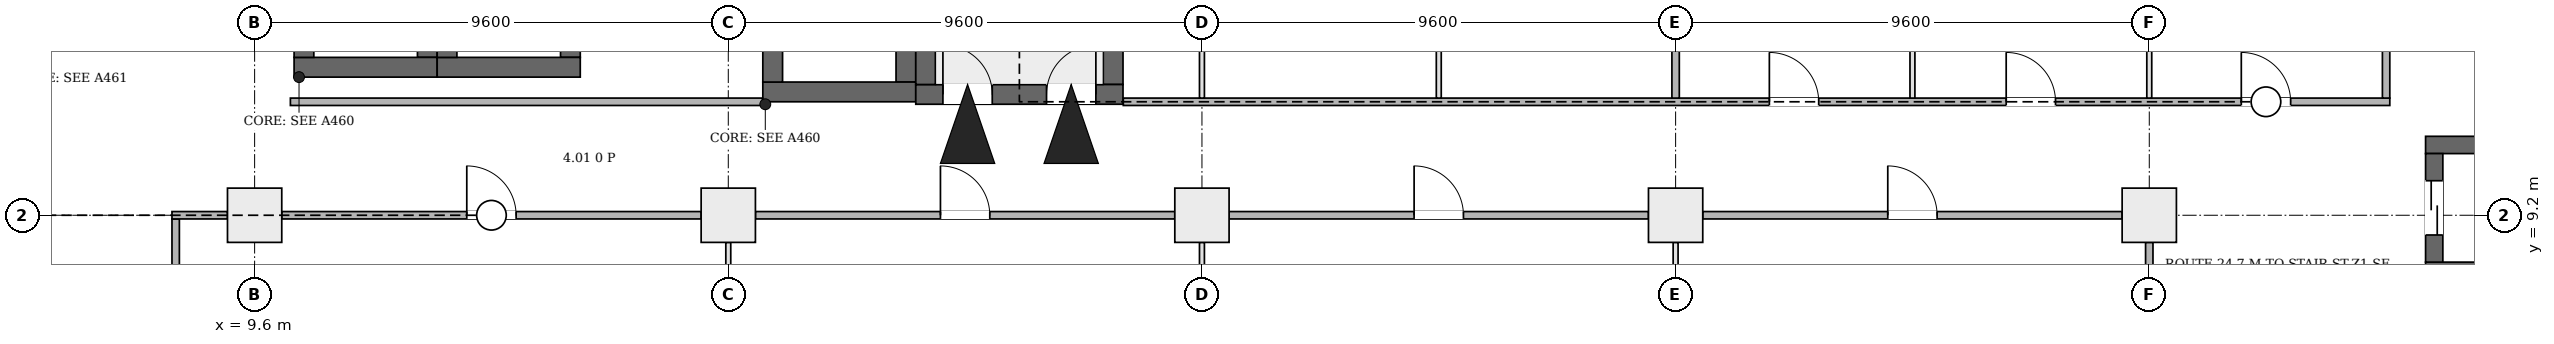
"""IFC4 building model, lengths in metres.
Left out: names, types, materials, properties, quantities, classifications, styles, units other than length and angle.
Written with IfcOpenShell. Run it as: python <this file> out.ifc"""

import sys

from ifc_helpers import new_model, si_unit, direction, frame, frame_2d, origin, origin_2d, place, context, subcontext, project, spatial, rectangle, extrude, element, fill, save


model = new_model("IFC4")
c1 = context("Model", 3, precision=1e-05, world=origin(), true_north=direction((0.0, 1.0)))
c2 = subcontext(c1, "Body", "Model", "MODEL_VIEW")
j1 = project(units=[si_unit("LENGTHUNIT", "METRE"), si_unit("PLANEANGLEUNIT", "RADIAN")], contexts=[c1])
p1 = place(None, origin())
s1 = spatial("IfcSite", under=j1, at=p1, CompositionType="ELEMENT")
p2 = place(p1, origin())
s2 = spatial("IfcBuilding", under=s1, at=p2, CompositionType="ELEMENT")
p3 = place(p2, frame((0.0, 0.0, 26.7)))
s3 = spatial("IfcBuildingStorey", under=s2, at=p3, CompositionType="ELEMENT", Elevation=26.7)
p4 = place(p3, frame((23.0, 11.65, 0.0), z_axis=(0.0, 0.0, 1.0), x_axis=(1.0, 0.0, 0.0)))
e1 = element("IfcWall", 1, at=p4, inside=s3, PredefinedType="SHEAR", context=c2, shape_type="SweptSolid", body=[
    extrude(rectangle(XDim=4.2, YDim=0.4, at=frame_2d((2.1, 0.0))), origin(), (0.0, 0.0, 1.0), 5.2),
])
p5 = place(p4, frame((0.55, 0.0, 0.0)))
e2 = element("IfcOpeningElement", 2, at=p5, cuts=e1, PredefinedType="OPENING", context=c2, shape_type="SweptSolid", body=[
    extrude(rectangle(XDim=1.0, YDim=2.1, at=frame_2d((0.5, 1.05))), frame((0.0, 0.21, 0.0), z_axis=(0.0, -1.0, 0.0), x_axis=(1.0, 0.0, 0.0)), (0.0, 0.0, 1.0), 0.42),
])
p6 = place(p4, frame((2.65, 0.0, 0.0)))
e3 = element("IfcOpeningElement", 3, at=p6, cuts=e1, PredefinedType="OPENING", context=c2, shape_type="SweptSolid", body=[
    extrude(rectangle(XDim=1.0, YDim=2.1, at=frame_2d((0.5, 1.05))), frame((0.0, 0.21, 0.0), z_axis=(0.0, -1.0, 0.0), x_axis=(1.0, 0.0, 0.0)), (0.0, 0.0, 1.0), 0.42),
])
for number, where, z_axis, x_axis in (
    (4, (23.2, 11.85, 0.0), (0.0, 0.0, 1.0), (0.0, 1.0, 0.0)),
    (5, (27.0, 11.85, 0.0), (0.0, 0.0, 1.0), (0.0, 1.0, 0.0)),
):
    element("IfcWall", number, at=place(p3, frame(where, z_axis=z_axis, x_axis=x_axis)), inside=s3, PredefinedType="SHEAR", context=c2, shape_type="SweptSolid", body=[
        extrude(rectangle(XDim=6.6, YDim=0.4, at=frame_2d((3.3, 0.0))), origin(), (0.0, 0.0, 1.0), 5.2),
    ])
for number, where, z_axis, x_axis in (
    (6, (53.6, 8.075, 0.0), (0.0, 0.0, 1.0), (1.0, 0.0, 0.0)),
    (7, (53.6, 10.625, 0.0), (0.0, 0.0, 1.0), (1.0, 0.0, 0.0)),
):
    element("IfcWall", number, at=place(p3, frame(where, z_axis=z_axis, x_axis=x_axis)), inside=s3, PredefinedType="SHEAR", context=c2, shape_type="SweptSolid", body=[
        extrude(rectangle(XDim=3.8, YDim=0.35, at=frame_2d((1.9, 0.0))), origin(), (0.0, 0.0, 1.0), 5.2),
    ])
p7 = place(p3, frame((53.775, 8.25, 0.0), z_axis=(0.0, 0.0, 1.0), x_axis=(0.0, 1.0, 0.0)))
e8 = element("IfcWall", 8, at=p7, inside=s3, PredefinedType="SHEAR", context=c2, shape_type="SweptSolid", body=[
    extrude(rectangle(XDim=2.2, YDim=0.35, at=frame_2d((1.1, 0.0))), origin(), (0.0, 0.0, 1.0), 5.2),
])
p8 = place(p7, frame((0.55, 0.0, 0.0)))
e9 = element("IfcOpeningElement", 9, at=p8, cuts=e8, PredefinedType="OPENING", context=c2, shape_type="SweptSolid", body=[
    extrude(rectangle(XDim=1.1, YDim=2.1, at=frame_2d((0.55, 1.05))), frame((0.0, 0.185, 0.0), z_axis=(0.0, -1.0, 0.0), x_axis=(1.0, 0.0, 0.0)), (0.0, 0.0, 1.0), 0.37),
])
p9 = place(p3, frame((10.4, 12.2, 0.0), z_axis=(0.0, 0.0, 1.0), x_axis=(1.0, 0.0, 0.0)))
e10 = element("IfcWall", 10, at=p9, inside=s3, PredefinedType="SHEAR", context=c2, shape_type="SweptSolid", body=[
    extrude(rectangle(XDim=2.9, YDim=0.4, at=frame_2d((1.45, 0.0))), origin(), (0.0, 0.0, 1.0), 5.2),
])
for number, where, z_axis, x_axis in (
    (11, (10.6, 12.4, 0.0), (0.0, 0.0, 1.0), (0.0, 1.0, 0.0)),
    (12, (13.1, 12.4, 0.0), (0.0, 0.0, 1.0), (0.0, 1.0, 0.0)),
):
    element("IfcWall", number, at=place(p3, frame(where, z_axis=z_axis, x_axis=x_axis)), inside=s3, PredefinedType="SHEAR", context=c2, shape_type="SweptSolid", body=[
        extrude(rectangle(XDim=3.0, YDim=0.4, at=frame_2d((1.5, 0.0))), origin(), (0.0, 0.0, 1.0), 5.2),
    ])
p10 = place(p3, frame((13.3, 12.2, 0.0), z_axis=(0.0, 0.0, 1.0), x_axis=(1.0, 0.0, 0.0)))
e13 = element("IfcWall", 13, at=p10, inside=s3, PredefinedType="SHEAR", context=c2, shape_type="SweptSolid", body=[
    extrude(rectangle(XDim=2.9, YDim=0.4, at=frame_2d((1.45, 0.0))), origin(), (0.0, 0.0, 1.0), 5.2),
])
for number, where, z_axis, x_axis in (
    (14, (13.5, 12.4, 0.0), (0.0, 0.0, 1.0), (0.0, 1.0, 0.0)),
    (15, (16.0, 12.4, 0.0), (0.0, 0.0, 1.0), (0.0, 1.0, 0.0)),
):
    element("IfcWall", number, at=place(p3, frame(where, z_axis=z_axis, x_axis=x_axis)), inside=s3, PredefinedType="SHEAR", context=c2, shape_type="SweptSolid", body=[
        extrude(rectangle(XDim=3.0, YDim=0.4, at=frame_2d((1.5, 0.0))), origin(), (0.0, 0.0, 1.0), 5.2),
    ])
p11 = place(p3, frame((19.9, 11.7, 0.0), z_axis=(0.0, 0.0, 1.0), x_axis=(1.0, 0.0, 0.0)))
e16 = element("IfcWall", 16, at=p11, inside=s3, PredefinedType="SHEAR", context=c2, shape_type="SweptSolid", body=[
    extrude(rectangle(XDim=3.1, YDim=0.4, at=frame_2d((1.55, 0.0))), origin(), (0.0, 0.0, 1.0), 5.2),
])
for number, where, z_axis, x_axis in (
    (17, (20.1, 11.9, 0.0), (0.0, 0.0, 1.0), (0.0, 1.0, 0.0)),
    (18, (22.8, 11.9, 0.0), (0.0, 0.0, 1.0), (0.0, 1.0, 0.0)),
):
    element("IfcWall", number, at=place(p3, frame(where, z_axis=z_axis, x_axis=x_axis)), inside=s3, PredefinedType="SHEAR", context=c2, shape_type="SweptSolid", body=[
        extrude(rectangle(XDim=3.4, YDim=0.4, at=frame_2d((1.7, 0.0))), origin(), (0.0, 0.0, 1.0), 5.2),
    ])
for number, where, z_axis, x_axis in (
    (19, (9.6, 9.2, 0.0), (0.0, 0.0, 1.0), (1.0, 0.0, 0.0)),
    (20, (19.2, 9.2, 0.0), (0.0, 0.0, 1.0), (1.0, 0.0, 0.0)),
    (21, (28.8, 9.2, 0.0), (0.0, 0.0, 1.0), (1.0, 0.0, 0.0)),
    (22, (38.4, 9.2, 0.0), (0.0, 0.0, 1.0), (1.0, 0.0, 0.0)),
    (23, (48.0, 9.2, 0.0), (0.0, 0.0, 1.0), (1.0, 0.0, 0.0)),
):
    element("IfcColumn", number, at=place(p3, frame(where, z_axis=z_axis, x_axis=x_axis)), inside=s3, PredefinedType="COLUMN", context=c2, shape_type="SweptSolid", body=[
        extrude(rectangle(XDim=1.1, YDim=1.1, at=origin_2d()), origin(), (0.0, 0.0, 1.0), 5.2),
    ])
p12 = place(p3, frame((8.0, 0.206, 0.0), z_axis=(0.0, 0.0, 1.0), x_axis=(0.0, 1.0, 0.0)))
e24 = element("IfcWall", 24, at=p12, inside=s3, PredefinedType="PARTITIONING", context=c2, shape_type="SweptSolid", body=[
    extrude(rectangle(XDim=8.919, YDim=0.15, at=frame_2d((4.459, 0.0))), origin(), (0.0, 0.0, 1.0), 4.85),
])
p13 = place(p3, frame((7.925, 9.2, 0.0), z_axis=(0.0, 0.0, 1.0), x_axis=(1.0, 0.0, 0.0)))
e25 = element("IfcWall", 25, at=p13, inside=s3, PredefinedType="PARTITIONING", context=c2, shape_type="SweptSolid", body=[
    extrude(rectangle(XDim=1.125, YDim=0.15, at=frame_2d((0.562, 0.0))), origin(), (0.0, 0.0, 1.0), 4.45),
])
p14 = place(p3, frame((10.15, 9.2, 0.0), z_axis=(0.0, 0.0, 1.0), x_axis=(1.0, 0.0, 0.0)))
e26 = element("IfcWall", 26, at=p14, inside=s3, PredefinedType="PARTITIONING", context=c2, shape_type="SweptSolid", body=[
    extrude(rectangle(XDim=8.5, YDim=0.15, at=frame_2d((4.25, 0.0))), origin(), (0.0, 0.0, 1.0), 4.45),
])
p15 = place(p14, frame((3.75, 0.0, 0.0)))
e27 = element("IfcOpeningElement", 27, at=p15, cuts=e26, PredefinedType="OPENING", context=c2, shape_type="SweptSolid", body=[
    extrude(rectangle(XDim=1.0, YDim=2.1, at=frame_2d((0.5, 1.05))), frame((0.0, 0.085, 0.0), z_axis=(0.0, -1.0, 0.0), x_axis=(1.0, 0.0, 0.0)), (0.0, 0.0, 1.0), 0.17),
])
p16 = place(p3, frame((10.325, 11.5, 0.0), z_axis=(0.0, 0.0, 1.0), x_axis=(1.0, 0.0, 0.0)))
e28 = element("IfcWall", 28, at=p16, inside=s3, PredefinedType="PARTITIONING", context=c2, shape_type="SweptSolid", body=[
    extrude(rectangle(XDim=9.569, YDim=0.15, at=frame_2d((4.785, 0.0))), origin(), (0.0, 0.0, 1.0), 4.85),
])
p17 = place(p3, frame((19.2, 1.0, 0.0), z_axis=(0.0, 0.0, 1.0), x_axis=(0.0, 1.0, 0.0)))
e29 = element("IfcWall", 29, at=p17, inside=s3, PredefinedType="PARTITIONING", context=c2, shape_type="SweptSolid", body=[
    extrude(rectangle(XDim=7.65, YDim=0.1, at=frame_2d((3.825, 0.0))), origin(), (0.0, 0.0, 1.0), 4.45),
])
p18 = place(p3, frame((19.75, 9.2, 0.0), z_axis=(0.0, 0.0, 1.0), x_axis=(1.0, 0.0, 0.0)))
e30 = element("IfcWall", 30, at=p18, inside=s3, PredefinedType="PARTITIONING", context=c2, shape_type="SweptSolid", body=[
    extrude(rectangle(XDim=8.5, YDim=0.15, at=frame_2d((4.25, 0.0))), origin(), (0.0, 0.0, 1.0), 4.45),
])
p19 = place(p18, frame((3.75, 0.0, 0.0)))
e31 = element("IfcOpeningElement", 31, at=p19, cuts=e30, PredefinedType="OPENING", context=c2, shape_type="SweptSolid", body=[
    extrude(rectangle(XDim=1.0, YDim=2.1, at=frame_2d((0.5, 1.05))), frame((0.0, 0.085, 0.0), z_axis=(0.0, -1.0, 0.0), x_axis=(1.0, 0.0, 0.0)), (0.0, 0.0, 1.0), 0.17),
])
p20 = place(p3, frame((27.206, 11.5, 0.0), z_axis=(0.0, 0.0, 1.0), x_axis=(1.0, 0.0, 0.0)))
e32 = element("IfcWall", 32, at=p20, inside=s3, PredefinedType="PARTITIONING", context=c2, shape_type="SweptSolid", body=[
    extrude(rectangle(XDim=25.669, YDim=0.15, at=frame_2d((12.834, 0.0))), origin(), (0.0, 0.0, 1.0), 4.85),
])
p21 = place(p20, frame((13.094, 0.0, 0.0)))
e33 = element("IfcOpeningElement", 33, at=p21, cuts=e32, PredefinedType="OPENING", context=c2, shape_type="SweptSolid", body=[
    extrude(rectangle(XDim=1.0, YDim=2.1, at=frame_2d((0.5, 1.05))), frame((0.0, 0.085, 0.0), z_axis=(0.0, -1.0, 0.0), x_axis=(1.0, 0.0, 0.0)), (0.0, 0.0, 1.0), 0.17),
])
p22 = place(p20, frame((17.894, 0.0, 0.0)))
e34 = element("IfcOpeningElement", 34, at=p22, cuts=e32, PredefinedType="OPENING", context=c2, shape_type="SweptSolid", body=[
    extrude(rectangle(XDim=1.0, YDim=2.1, at=frame_2d((0.5, 1.05))), frame((0.0, 0.085, 0.0), z_axis=(0.0, -1.0, 0.0), x_axis=(1.0, 0.0, 0.0)), (0.0, 0.0, 1.0), 0.17),
])
p23 = place(p20, frame((22.659, 0.0, 0.0)))
e35 = element("IfcOpeningElement", 35, at=p23, cuts=e32, PredefinedType="OPENING", context=c2, shape_type="SweptSolid", body=[
    extrude(rectangle(XDim=1.0, YDim=2.1, at=frame_2d((0.5, 1.05))), frame((0.0, 0.085, 0.0), z_axis=(0.0, -1.0, 0.0), x_axis=(1.0, 0.0, 0.0)), (0.0, 0.0, 1.0), 0.17),
])
p24 = place(p3, frame((28.8, 1.0, 0.0), z_axis=(0.0, 0.0, 1.0), x_axis=(0.0, 1.0, 0.0)))
e36 = element("IfcWall", 36, at=p24, inside=s3, PredefinedType="PARTITIONING", context=c2, shape_type="SweptSolid", body=[
    extrude(rectangle(XDim=7.65, YDim=0.1, at=frame_2d((3.825, 0.0))), origin(), (0.0, 0.0, 1.0), 4.45),
])
p25 = place(p3, frame((28.8, 11.575, 0.0), z_axis=(0.0, 0.0, 1.0), x_axis=(0.0, 1.0, 0.0)))
e37 = element("IfcWall", 37, at=p25, inside=s3, PredefinedType="PARTITIONING", context=c2, shape_type="SweptSolid", body=[
    extrude(rectangle(XDim=4.05, YDim=0.1, at=frame_2d((2.025, 0.0))), origin(), (0.0, 0.0, 1.0), 4.45),
])
p26 = place(p3, frame((29.35, 9.2, 0.0), z_axis=(0.0, 0.0, 1.0), x_axis=(1.0, 0.0, 0.0)))
e38 = element("IfcWall", 38, at=p26, inside=s3, PredefinedType="PARTITIONING", context=c2, shape_type="SweptSolid", body=[
    extrude(rectangle(XDim=8.5, YDim=0.15, at=frame_2d((4.25, 0.0))), origin(), (0.0, 0.0, 1.0), 4.45),
])
p27 = place(p26, frame((3.75, 0.0, 0.0)))
e39 = element("IfcOpeningElement", 39, at=p27, cuts=e38, PredefinedType="OPENING", context=c2, shape_type="SweptSolid", body=[
    extrude(rectangle(XDim=1.0, YDim=2.1, at=frame_2d((0.5, 1.05))), frame((0.0, 0.085, 0.0), z_axis=(0.0, -1.0, 0.0), x_axis=(1.0, 0.0, 0.0)), (0.0, 0.0, 1.0), 0.17),
])
p28 = place(p3, frame((33.6, 11.575, 0.0), z_axis=(0.0, 0.0, 1.0), x_axis=(0.0, 1.0, 0.0)))
e40 = element("IfcWall", 40, at=p28, inside=s3, PredefinedType="PARTITIONING", context=c2, shape_type="SweptSolid", body=[
    extrude(rectangle(XDim=9.25, YDim=0.1, at=frame_2d((4.625, 0.0))), origin(), (0.0, 0.0, 1.0), 4.85),
])
p29 = place(p3, frame((38.4, 11.575, 0.0), z_axis=(0.0, 0.0, 1.0), x_axis=(0.0, 1.0, 0.0)))
e41 = element("IfcWall", 41, at=p29, inside=s3, PredefinedType="PARTITIONING", context=c2, shape_type="SweptSolid", body=[
    extrude(rectangle(XDim=6.275, YDim=0.15, at=frame_2d((3.138, 0.0))), origin(), (0.0, 0.0, 1.0), 4.45),
])
p30 = place(p3, frame((38.4, 1.0, 0.0), z_axis=(0.0, 0.0, 1.0), x_axis=(0.0, 1.0, 0.0)))
e42 = element("IfcWall", 42, at=p30, inside=s3, PredefinedType="PARTITIONING", context=c2, shape_type="SweptSolid", body=[
    extrude(rectangle(XDim=7.65, YDim=0.1, at=frame_2d((3.825, 0.0))), origin(), (0.0, 0.0, 1.0), 4.45),
])
p31 = place(p3, frame((38.95, 9.2, 0.0), z_axis=(0.0, 0.0, 1.0), x_axis=(1.0, 0.0, 0.0)))
e43 = element("IfcWall", 43, at=p31, inside=s3, PredefinedType="PARTITIONING", context=c2, shape_type="SweptSolid", body=[
    extrude(rectangle(XDim=8.5, YDim=0.15, at=frame_2d((4.25, 0.0))), origin(), (0.0, 0.0, 1.0), 4.45),
])
p32 = place(p31, frame((3.75, 0.0, 0.0)))
e44 = element("IfcOpeningElement", 44, at=p32, cuts=e43, PredefinedType="OPENING", context=c2, shape_type="SweptSolid", body=[
    extrude(rectangle(XDim=1.0, YDim=2.1, at=frame_2d((0.5, 1.05))), frame((0.0, 0.085, 0.0), z_axis=(0.0, -1.0, 0.0), x_axis=(1.0, 0.0, 0.0)), (0.0, 0.0, 1.0), 0.17),
])
p33 = place(p3, frame((43.2, 11.575, 0.0), z_axis=(0.0, 0.0, 1.0), x_axis=(0.0, 1.0, 0.0)))
e45 = element("IfcWall", 45, at=p33, inside=s3, PredefinedType="PARTITIONING", context=c2, shape_type="SweptSolid", body=[
    extrude(rectangle(XDim=7.35, YDim=0.1, at=frame_2d((3.675, 0.0))), origin(), (0.0, 0.0, 1.0), 4.85),
])
p34 = place(p3, frame((48.0, 1.0, 0.0), z_axis=(0.0, 0.0, 1.0), x_axis=(0.0, 1.0, 0.0)))
e46 = element("IfcWall", 46, at=p34, inside=s3, PredefinedType="PARTITIONING", context=c2, shape_type="SweptSolid", body=[
    extrude(rectangle(XDim=7.65, YDim=0.15, at=frame_2d((3.825, 0.0))), origin(), (0.0, 0.0, 1.0), 4.85),
])
p35 = place(p3, frame((48.0, 11.575, 0.0), z_axis=(0.0, 0.0, 1.0), x_axis=(0.0, 1.0, 0.0)))
e47 = element("IfcWall", 47, at=p35, inside=s3, PredefinedType="PARTITIONING", context=c2, shape_type="SweptSolid", body=[
    extrude(rectangle(XDim=6.275, YDim=0.1, at=frame_2d((3.138, 0.0))), origin(), (0.0, 0.0, 1.0), 4.85),
])
p36 = place(p3, frame((52.8, 11.575, 0.0), z_axis=(0.0, 0.0, 1.0), x_axis=(0.0, 1.0, 0.0)))
e48 = element("IfcWall", 48, at=p36, inside=s3, PredefinedType="PARTITIONING", context=c2, shape_type="SweptSolid", body=[
    extrude(rectangle(XDim=7.35, YDim=0.15, at=frame_2d((3.675, 0.0))), origin(), (0.0, 0.0, 1.0), 4.85),
])
p37 = place(p5, origin())
e49 = element("IfcDoor", 49, at=p37, inside=s3, OperationType="SINGLE_SWING_RIGHT", PredefinedType="DOOR", context=c2, shape_type="SweptSolid", body=[
    extrude(rectangle(XDim=1.0, YDim=2.1, at=frame_2d((0.5, 1.05))), frame((0.0, 0.025, 0.0), z_axis=(0.0, -1.0, 0.0), x_axis=(1.0, 0.0, 0.0)), (0.0, 0.0, 1.0), 0.05),
])
fill(e2, e49)
p38 = place(p6, origin())
e50 = element("IfcDoor", 50, at=p38, inside=s3, OperationType="SINGLE_SWING_LEFT", PredefinedType="DOOR", context=c2, shape_type="SweptSolid", body=[
    extrude(rectangle(XDim=1.0, YDim=2.1, at=frame_2d((0.5, 1.05))), frame((0.0, 0.025, 0.0), z_axis=(0.0, -1.0, 0.0), x_axis=(1.0, 0.0, 0.0)), (0.0, 0.0, 1.0), 0.05),
])
fill(e3, e50)
p39 = place(p8, origin())
e51 = element("IfcDoor", 51, at=p39, inside=s3, OperationType="DOUBLE_DOOR_SLIDING", PredefinedType="DOOR", context=c2, shape_type="SweptSolid", body=[
    extrude(rectangle(XDim=1.1, YDim=2.1, at=frame_2d((0.55, 1.05))), frame((0.0, 0.025, 0.0), z_axis=(0.0, -1.0, 0.0), x_axis=(1.0, 0.0, 0.0)), (0.0, 0.0, 1.0), 0.05),
])
fill(e9, e51)
p40 = place(p21, origin())
e52 = element("IfcDoor", 52, at=p40, inside=s3, OperationType="SINGLE_SWING_RIGHT", PredefinedType="DOOR", context=c2, shape_type="SweptSolid", body=[
    extrude(rectangle(XDim=1.0, YDim=2.1, at=frame_2d((0.5, 1.05))), frame((0.0, 0.025, 0.0), z_axis=(0.0, -1.0, 0.0), x_axis=(1.0, 0.0, 0.0)), (0.0, 0.0, 1.0), 0.05),
])
fill(e33, e52)
p41 = place(p22, origin())
e53 = element("IfcDoor", 53, at=p41, inside=s3, OperationType="SINGLE_SWING_RIGHT", PredefinedType="DOOR", context=c2, shape_type="SweptSolid", body=[
    extrude(rectangle(XDim=1.0, YDim=2.1, at=frame_2d((0.5, 1.05))), frame((0.0, 0.025, 0.0), z_axis=(0.0, -1.0, 0.0), x_axis=(1.0, 0.0, 0.0)), (0.0, 0.0, 1.0), 0.05),
])
fill(e34, e53)
p42 = place(p23, origin())
e54 = element("IfcDoor", 54, at=p42, inside=s3, OperationType="SINGLE_SWING_RIGHT", PredefinedType="DOOR", context=c2, shape_type="SweptSolid", body=[
    extrude(rectangle(XDim=1.0, YDim=2.1, at=frame_2d((0.5, 1.05))), frame((0.0, 0.025, 0.0), z_axis=(0.0, -1.0, 0.0), x_axis=(1.0, 0.0, 0.0)), (0.0, 0.0, 1.0), 0.05),
])
fill(e35, e54)
p43 = place(p15, origin())
e55 = element("IfcDoor", 55, at=p43, inside=s3, OperationType="SINGLE_SWING_RIGHT", PredefinedType="DOOR", context=c2, shape_type="SweptSolid", body=[
    extrude(rectangle(XDim=1.0, YDim=2.1, at=frame_2d((0.5, 1.05))), frame((0.0, 0.025, 0.0), z_axis=(0.0, -1.0, 0.0), x_axis=(1.0, 0.0, 0.0)), (0.0, 0.0, 1.0), 0.05),
])
fill(e27, e55)
p44 = place(p19, origin())
e56 = element("IfcDoor", 56, at=p44, inside=s3, OperationType="SINGLE_SWING_RIGHT", PredefinedType="DOOR", context=c2, shape_type="SweptSolid", body=[
    extrude(rectangle(XDim=1.0, YDim=2.1, at=frame_2d((0.5, 1.05))), frame((0.0, 0.025, 0.0), z_axis=(0.0, -1.0, 0.0), x_axis=(1.0, 0.0, 0.0)), (0.0, 0.0, 1.0), 0.05),
])
fill(e31, e56)
p45 = place(p27, origin())
e57 = element("IfcDoor", 57, at=p45, inside=s3, OperationType="SINGLE_SWING_RIGHT", PredefinedType="DOOR", context=c2, shape_type="SweptSolid", body=[
    extrude(rectangle(XDim=1.0, YDim=2.1, at=frame_2d((0.5, 1.05))), frame((0.0, 0.025, 0.0), z_axis=(0.0, -1.0, 0.0), x_axis=(1.0, 0.0, 0.0)), (0.0, 0.0, 1.0), 0.05),
])
fill(e39, e57)
p46 = place(p32, origin())
e58 = element("IfcDoor", 58, at=p46, inside=s3, OperationType="SINGLE_SWING_LEFT", PredefinedType="DOOR", context=c2, shape_type="SweptSolid", body=[
    extrude(rectangle(XDim=1.0, YDim=2.1, at=frame_2d((0.5, 1.05))), frame((0.0, 0.025, 0.0), z_axis=(0.0, -1.0, 0.0), x_axis=(1.0, 0.0, 0.0)), (0.0, 0.0, 1.0), 0.05),
])
fill(e44, e58)
save(model, sys.argv[1])
